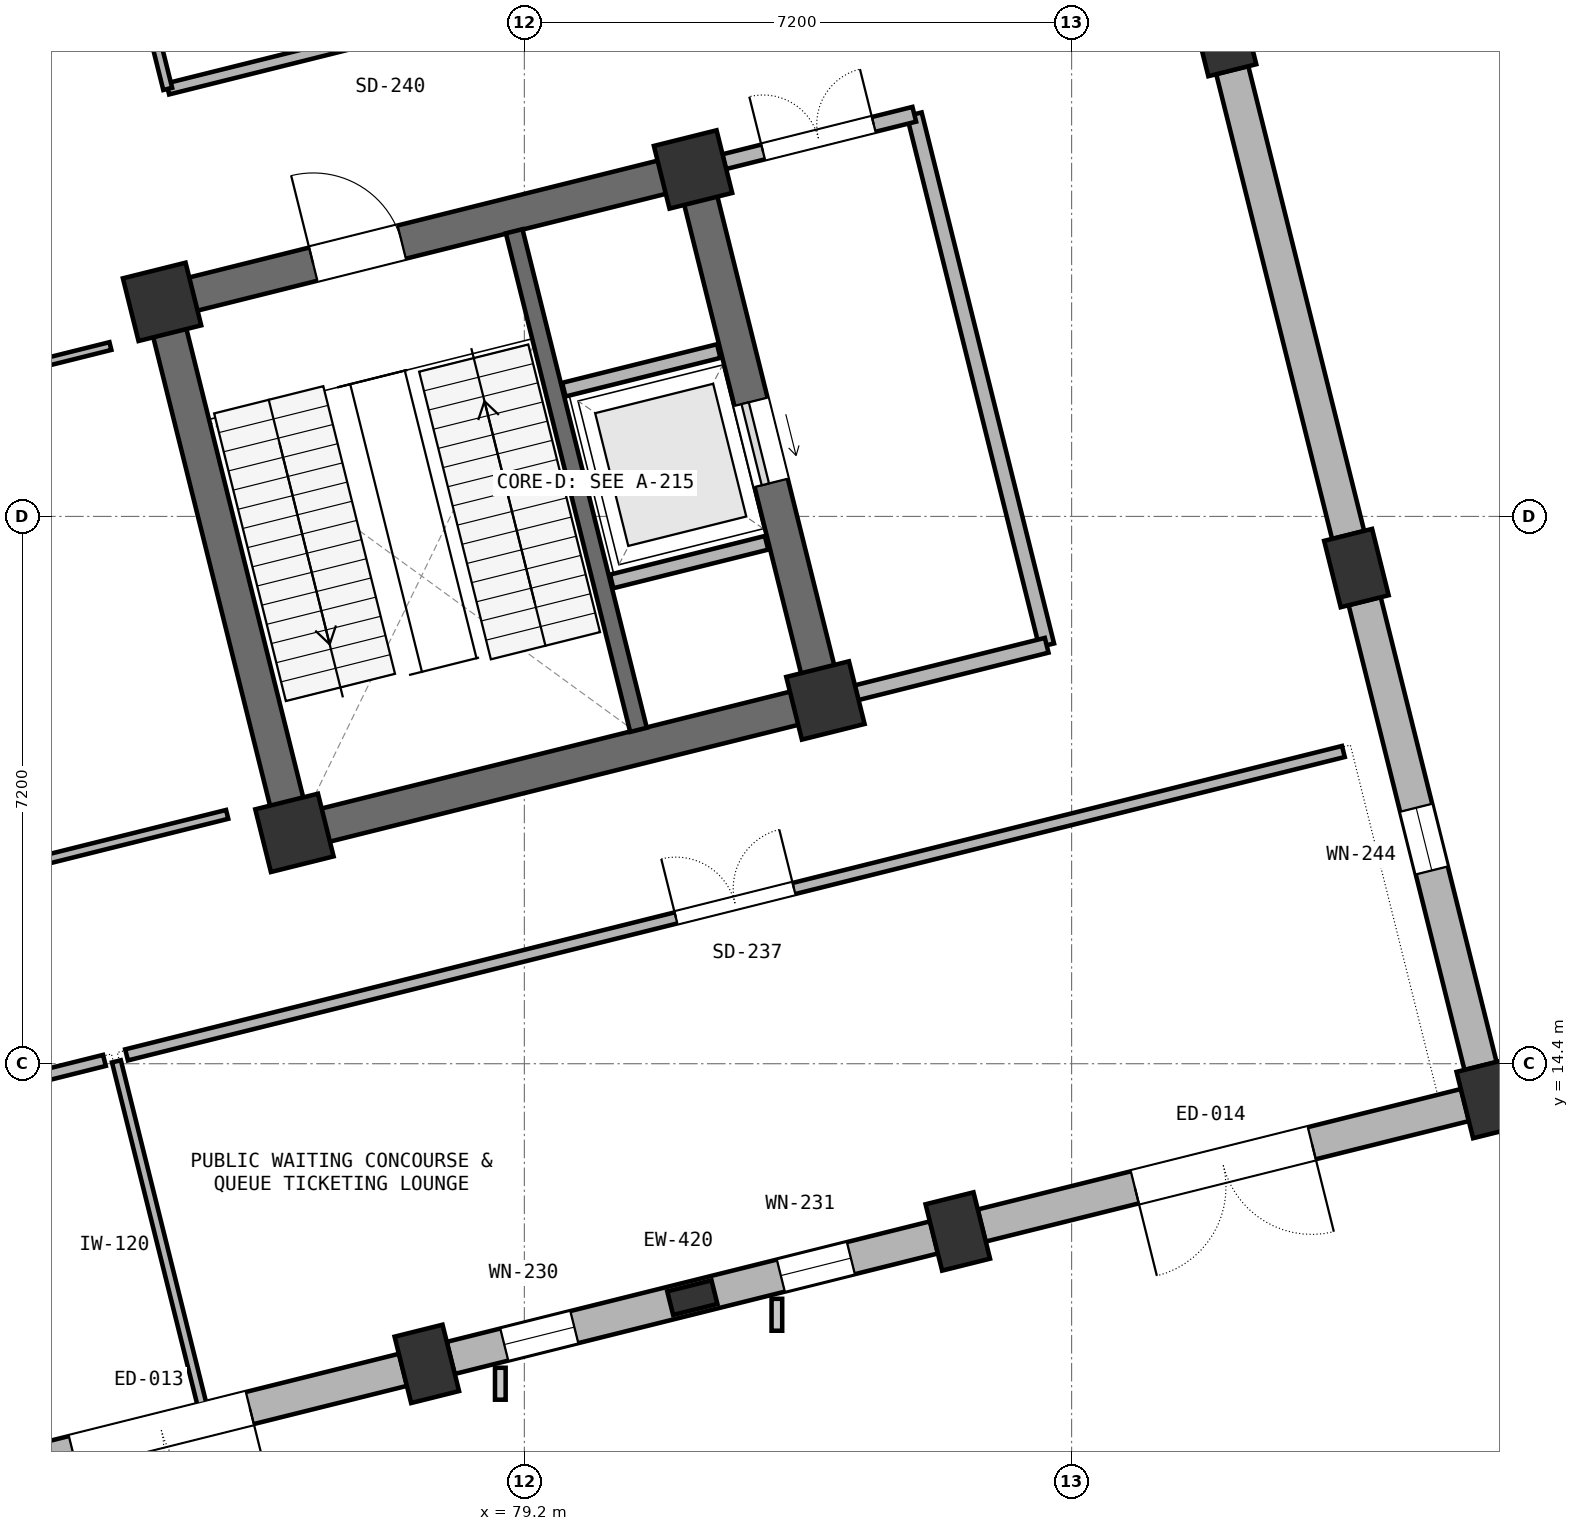
"""IFC4 building model, lengths in metres.
Left out: names, types, materials, properties, quantities, classifications, styles, units other than length and angle.
Written with IfcOpenShell. Run it as: python <this file> out.ifc"""

import sys

from ifc_helpers import new_model, si_unit, direction, frame, frame_2d, origin, origin_2d, place, context, subcontext, project, spatial, rectangle, extrude, element, fill, save


model = new_model("IFC4")
c1 = context("Model", 3, precision=1e-05, world=origin(), true_north=direction((0.0, 1.0)))
c2 = subcontext(c1, "Body", "Model", "MODEL_VIEW")
j1 = project(units=[si_unit("LENGTHUNIT", "METRE"), si_unit("PLANEANGLEUNIT", "RADIAN")], contexts=[c1])
p1 = place(None, origin())
s1 = spatial("IfcSite", under=j1, at=p1, CompositionType="ELEMENT")
p2 = place(p1, origin())
s2 = spatial("IfcBuilding", under=s1, at=p2, CompositionType="ELEMENT")
p3 = place(p2, origin())
s3 = spatial("IfcBuildingStorey", under=s2, at=p3, CompositionType="ELEMENT", Elevation=0.0)
p4 = place(p3, frame((77.917, 10.451, 0.0), z_axis=(0.0, 0.0, 1.0), x_axis=(0.970295726276, 0.2419218956, 0.0)))
e1 = element("IfcColumn", 1, at=p4, inside=s3, PredefinedType="COLUMN", context=c2, shape_type="SweptSolid", body=[
    extrude(rectangle(XDim=0.65, YDim=0.9, at=origin_2d()), origin(), (0.0, 0.0, 1.0), 5.4),
])
for number, where, z_axis, x_axis in (
    (2, (76.175, 17.437, 0.0), (0.0, 0.0, 1.0), (0.97, 0.242, 0.0)),
    (3, (74.433, 24.423, 0.0), (0.0, 0.0, 1.0), (0.97, 0.242, 0.0)),
):
    element("IfcColumn", number, at=place(p3, frame(where, z_axis=z_axis, x_axis=x_axis)), inside=s3, PredefinedType="COLUMN", context=c2, shape_type="SweptSolid", body=[
        extrude(rectangle(XDim=0.85, YDim=0.85, at=origin_2d()), origin(), (0.0, 0.0, 1.0), 5.4),
    ])
p5 = place(p3, frame((84.903, 12.193, 0.0), z_axis=(0.0, 0.0, 1.0), x_axis=(0.970295726276, 0.2419218956, 0.0)))
e4 = element("IfcColumn", 4, at=p5, inside=s3, PredefinedType="COLUMN", context=c2, shape_type="SweptSolid", body=[
    extrude(rectangle(XDim=0.65, YDim=0.9, at=origin_2d()), origin(), (0.0, 0.0, 1.0), 5.4),
])
for number, where, z_axis, x_axis in (
    (5, (83.161, 19.179, 0.0), (0.0, 0.0, 1.0), (0.97, 0.242, 0.0)),
    (6, (81.419, 26.165, 0.0), (0.0, 0.0, 1.0), (0.97, 0.242, 0.0)),
):
    element("IfcColumn", number, at=place(p3, frame(where, z_axis=z_axis, x_axis=x_axis)), inside=s3, PredefinedType="COLUMN", context=c2, shape_type="SweptSolid", body=[
        extrude(rectangle(XDim=0.85, YDim=0.85, at=origin_2d()), origin(), (0.0, 0.0, 1.0), 5.4),
    ])
for number, where, z_axis, x_axis in (
    (7, (91.889, 13.935, 0.0), (0.0, 0.0, 1.0), (0.97, 0.242, 0.0)),
    (8, (90.147, 20.921, 0.0), (0.0, 0.0, 1.0), (0.97, 0.242, 0.0)),
    (9, (88.405, 27.907, 0.0), (0.0, 0.0, 1.0), (0.97, 0.242, 0.0)),
):
    element("IfcColumn", number, at=place(p3, frame(where, z_axis=z_axis, x_axis=x_axis)), inside=s3, PredefinedType="COLUMN", context=c2, shape_type="SweptSolid", body=[
        extrude(rectangle(XDim=0.65, YDim=0.9, at=origin_2d()), origin(), (0.0, 0.0, 1.0), 5.4),
    ])
p6 = place(p3, frame((81.41, 11.322, 0.0), z_axis=(0.0, 0.0, 1.0), x_axis=(0.970295726276, 0.2419218956, 0.0)))
e10 = element("IfcColumn", 10, at=p6, inside=s3, PredefinedType="PILASTER", context=c2, shape_type="SweptSolid", body=[
    extrude(rectangle(XDim=0.6, YDim=0.32, at=origin_2d()), origin(), (0.0, 0.0, 1.0), 5.4),
])
p7 = place(p3, frame((76.515, 17.522, 0.0), z_axis=(0.0, 0.0, 1.0), x_axis=(0.970294759049, 0.241925774902, 0.0)))
e11 = element("IfcWall", 11, at=p7, inside=s3, PredefinedType="SHEAR", context=c2, shape_type="SweptSolid", body=[
    extrude(rectangle(XDim=6.5, YDim=0.45, at=frame_2d((3.25, 0.0))), origin(), (0.0, 0.0, 1.0), 5.4),
])
p8 = place(p3, frame((83.076, 19.519, 0.0), z_axis=(0.0, 0.0, 1.0), x_axis=(-0.241925774902, 0.970294759049, 0.0)))
e12 = element("IfcWall", 12, at=p8, inside=s3, PredefinedType="SHEAR", context=c2, shape_type="SweptSolid", body=[
    extrude(rectangle(XDim=6.5, YDim=0.45, at=frame_2d((3.25, 0.0))), origin(), (0.0, 0.0, 1.0), 5.4),
])
p9 = place(p8, frame((2.6, 0.0, 0.0)))
e13 = element("IfcOpeningElement", 13, at=p9, cuts=e12, PredefinedType="OPENING", context=c2, shape_type="SweptSolid", body=[
    extrude(rectangle(XDim=1.1, YDim=2.2, at=frame_2d((0.55, 1.1))), frame((0.0, 0.235, 0.0), z_axis=(0.0, -1.0, 0.0), x_axis=(1.0, 0.0, 0.0)), (0.0, 0.0, 1.0), 0.47),
])
p10 = place(p3, frame((81.08, 26.081, 0.0), z_axis=(0.0, 0.0, 1.0), x_axis=(-0.970294759049, -0.241925774902, 0.0)))
e14 = element("IfcWall", 14, at=p10, inside=s3, PredefinedType="SHEAR", context=c2, shape_type="SweptSolid", body=[
    extrude(rectangle(XDim=6.5, YDim=0.45, at=frame_2d((3.25, 0.0))), origin(), (0.0, 0.0, 1.0), 5.4),
])
p11 = place(p10, frame((3.6, 0.0, 0.0)))
e15 = element("IfcOpeningElement", 15, at=p11, cuts=e14, PredefinedType="OPENING", context=c2, shape_type="SweptSolid", body=[
    extrude(rectangle(XDim=1.2, YDim=2.2, at=frame_2d((0.6, 1.1))), frame((0.0, 0.235, 0.0), z_axis=(0.0, -1.0, 0.0), x_axis=(1.0, 0.0, 0.0)), (0.0, 0.0, 1.0), 0.47),
])
p12 = place(p3, frame((74.518, 24.084, 0.0), z_axis=(0.0, 0.0, 1.0), x_axis=(0.241925774902, -0.970294759049, 0.0)))
e16 = element("IfcWall", 16, at=p12, inside=s3, PredefinedType="SHEAR", context=c2, shape_type="SweptSolid", body=[
    extrude(rectangle(XDim=6.5, YDim=0.45, at=frame_2d((3.25, 0.0))), origin(), (0.0, 0.0, 1.0), 5.4),
])
p13 = place(p3, frame((80.701, 18.792, 0.0), z_axis=(0.0, 0.0, 1.0), x_axis=(-0.241898249226, 0.970301621673, 0.0)))
e17 = element("IfcWall", 17, at=p13, inside=s3, PredefinedType="SHEAR", context=c2, shape_type="SweptSolid", body=[
    extrude(rectangle(XDim=6.76, YDim=0.225, at=frame_2d((3.38, 0.0))), origin(), (0.0, 0.0, 1.0), 5.4),
])
for number, where, z_axis, x_axis in (
    (18, (80.349, 20.745, 0.0), (0.0, 0.0, 1.0), (0.97, 0.242, 0.0)),
    (19, (79.72, 23.268, 0.0), (0.0, 0.0, 1.0), (0.97, 0.242, 0.0)),
):
    element("IfcWall", number, at=place(p3, frame(where, z_axis=z_axis, x_axis=x_axis)), inside=s3, PredefinedType="PARTITIONING", context=c2, shape_type="SweptSolid", body=[
        extrude(rectangle(XDim=2.1, YDim=0.185, at=frame_2d((1.05, 0.0))), origin(), (0.0, 0.0, 1.0), 5.4),
    ])
p14 = place(p3, frame((71.244, 8.787, 0.0), z_axis=(0.0, 0.0, 1.0), x_axis=(0.970297881629, 0.241913250789, 0.0)))
e20 = element("IfcWall", 20, at=p14, inside=s3, PredefinedType="SOLIDWALL", context=c2, shape_type="SweptSolid", body=[
    extrude(rectangle(XDim=6.554, YDim=0.435, at=frame_2d((3.277, 0.0))), origin(), (0.0, 0.0, 1.0), 4.1),
])
p15 = place(p14, frame((2.077, 0.0, 0.0)))
e21 = element("IfcOpeningElement", 21, at=p15, cuts=e20, PredefinedType="OPENING", context=c2, shape_type="SweptSolid", body=[
    extrude(rectangle(XDim=2.4, YDim=2.8, at=frame_2d((1.2, 1.4))), frame((0.0, 0.228, 0.0), z_axis=(0.0, -1.0, 0.0), x_axis=(1.0, 0.0, 0.0)), (0.0, 0.0, 1.0), 0.455),
])
p16 = place(p3, frame((78.23, 10.529, 0.0), z_axis=(0.0, 0.0, 1.0), x_axis=(0.970291317579, 0.24193957723, 0.0)))
e22 = element("IfcWall", 22, at=p16, inside=s3, PredefinedType="SOLIDWALL", context=c2, shape_type="SweptSolid", body=[
    extrude(rectangle(XDim=6.554, YDim=0.435, at=frame_2d((3.277, 0.0))), origin(), (0.0, 0.0, 1.0), 4.1),
])
p17 = place(p16, frame((0.727, 0.0, 0.7)))
e23 = element("IfcOpeningElement", 23, at=p17, cuts=e22, PredefinedType="OPENING", context=c2, shape_type="SweptSolid", body=[
    extrude(rectangle(XDim=0.95, YDim=2.4, at=frame_2d((0.475, 1.2))), frame((0.0, 0.228, 0.0), z_axis=(0.0, -1.0, 0.0), x_axis=(1.0, 0.0, 0.0)), (0.0, 0.0, 1.0), 0.455),
])
p18 = place(p16, frame((4.477, 0.0, 0.7)))
e24 = element("IfcOpeningElement", 24, at=p18, cuts=e22, PredefinedType="OPENING", context=c2, shape_type="SweptSolid", body=[
    extrude(rectangle(XDim=0.95, YDim=2.4, at=frame_2d((0.475, 1.2))), frame((0.0, 0.228, 0.0), z_axis=(0.0, -1.0, 0.0), x_axis=(1.0, 0.0, 0.0)), (0.0, 0.0, 1.0), 0.455),
])
p19 = place(p3, frame((85.216, 12.271, 0.0), z_axis=(0.0, 0.0, 1.0), x_axis=(0.970300061562, 0.241904507055, 0.0)))
e25 = element("IfcWall", 25, at=p19, inside=s3, PredefinedType="SOLIDWALL", context=c2, shape_type="SweptSolid", body=[
    extrude(rectangle(XDim=6.554, YDim=0.435, at=frame_2d((3.277, 0.0))), origin(), (0.0, 0.0, 1.0), 4.1),
])
p20 = place(p19, frame((2.077, 0.0, 0.0)))
e26 = element("IfcOpeningElement", 26, at=p20, cuts=e25, PredefinedType="OPENING", context=c2, shape_type="SweptSolid", body=[
    extrude(rectangle(XDim=2.4, YDim=2.8, at=frame_2d((1.2, 1.4))), frame((0.0, 0.228, 0.0), z_axis=(0.0, -1.0, 0.0), x_axis=(1.0, 0.0, 0.0)), (0.0, 0.0, 1.0), 0.455),
])
p21 = place(p3, frame((91.781, 14.369, 0.0), z_axis=(0.0, 0.0, 1.0), x_axis=(-0.241934154531, 0.970292669699, 0.0)))
e27 = element("IfcWall", 27, at=p21, inside=s3, PredefinedType="SOLIDWALL", context=c2, shape_type="SweptSolid", body=[
    extrude(rectangle(XDim=6.304, YDim=0.435, at=frame_2d((3.152, 0.0))), origin(), (0.0, 0.0, 1.0), 4.1),
])
p22 = place(p21, frame((2.652, 0.0, 0.7)))
e28 = element("IfcOpeningElement", 28, at=p22, cuts=e27, PredefinedType="OPENING", context=c2, shape_type="SweptSolid", body=[
    extrude(rectangle(XDim=0.85, YDim=2.2, at=frame_2d((0.425, 1.1))), frame((0.0, 0.228, 0.0), z_axis=(0.0, -1.0, 0.0), x_axis=(1.0, 0.0, 0.0)), (0.0, 0.0, 1.0), 0.455),
])
p23 = place(p3, frame((90.039, 21.355, 0.0), z_axis=(0.0, 0.0, 1.0), x_axis=(-0.241934154531, 0.970292669699, 0.0)))
e29 = element("IfcWall", 29, at=p23, inside=s3, PredefinedType="SOLIDWALL", context=c2, shape_type="SweptSolid", body=[
    extrude(rectangle(XDim=6.304, YDim=0.435, at=frame_2d((3.152, 0.0))), origin(), (0.0, 0.0, 1.0), 4.1),
])
p24 = place(p3, frame((86.072, 19.905, 0.0), z_axis=(0.0, 0.0, 1.0), x_axis=(-0.241937193493, 0.970291911955, 0.0)))
e30 = element("IfcWall", 30, at=p24, inside=s3, PredefinedType="PARTITIONING", context=c2, shape_type="SweptSolid", body=[
    extrude(rectangle(XDim=7.2, YDim=0.2, at=frame_2d((3.6, 0.0))), origin(), (0.0, 0.0, 1.0), 4.12),
])
p25 = place(p3, frame((83.569, 19.281, 0.0), z_axis=(0.0, 0.0, 1.0), x_axis=(0.970287048366, 0.241956698135, 0.0)))
e31 = element("IfcWall", 31, at=p25, inside=s3, PredefinedType="PARTITIONING", context=c2, shape_type="SweptSolid", body=[
    extrude(rectangle(XDim=2.58, YDim=0.2, at=frame_2d((1.29, 0.0))), origin(), (0.0, 0.0, 1.0), 4.12),
])
p26 = place(p3, frame((84.33, 26.891, 0.0), z_axis=(0.0, 0.0, 1.0), x_axis=(-0.970309259708, -0.2418676095, 0.0)))
e32 = element("IfcWall", 32, at=p26, inside=s3, PredefinedType="PARTITIONING", context=c2, shape_type="SweptSolid", body=[
    extrude(rectangle(XDim=2.58, YDim=0.2, at=frame_2d((1.29, 0.0))), origin(), (0.0, 0.0, 1.0), 4.12),
])
p27 = place(p26, frame((0.55, 0.0, 0.0)))
e33 = element("IfcOpeningElement", 33, at=p27, cuts=e32, PredefinedType="OPENING", context=c2, shape_type="SweptSolid", body=[
    extrude(rectangle(XDim=1.5, YDim=2.2, at=frame_2d((0.75, 1.1))), frame((0.0, 0.11, 0.0), z_axis=(0.0, -1.0, 0.0), x_axis=(1.0, 0.0, 0.0)), (0.0, 0.0, 1.0), 0.22),
])
p28 = place(p3, frame((54.172, 9.581, 0.0), z_axis=(0.0, 0.0, 1.0), x_axis=(0.970297344298, 0.241915405976, 0.0)))
e34 = element("IfcWall", 34, at=p28, inside=s3, PredefinedType="PARTITIONING", context=c2, shape_type="SweptSolid", body=[
    extrude(rectangle(XDim=20.1, YDim=0.15, at=frame_2d((10.05, 0.0))), origin(), (0.0, 0.0, 1.0), 4.12),
])
p29 = place(p28, frame((1.65, 0.0, 0.0)))
e35 = element("IfcOpeningElement", 35, at=p29, cuts=e34, PredefinedType="OPENING", context=c2, shape_type="SweptSolid", body=[
    extrude(rectangle(XDim=1.6, YDim=2.2, at=frame_2d((0.8, 1.1))), frame((0.0, 0.085, 0.0), z_axis=(0.0, -1.0, 0.0), x_axis=(1.0, 0.0, 0.0)), (0.0, 0.0, 1.0), 0.17),
])
p30 = place(p3, frame((73.966, 14.516, 0.0), z_axis=(0.0, 0.0, 1.0), x_axis=(0.970295493964, 0.24192282735, 0.0)))
e36 = element("IfcWall", 36, at=p30, inside=s3, PredefinedType="PARTITIONING", context=c2, shape_type="SweptSolid", body=[
    extrude(rectangle(XDim=16.5, YDim=0.15, at=frame_2d((8.25, 0.0))), origin(), (0.0, 0.0, 1.0), 4.12),
])
p31 = place(p30, frame((7.45, 0.0, 0.0)))
e37 = element("IfcOpeningElement", 37, at=p31, cuts=e36, PredefinedType="OPENING", context=c2, shape_type="SweptSolid", body=[
    extrude(rectangle(XDim=1.6, YDim=2.2, at=frame_2d((0.8, 1.1))), frame((0.0, 0.085, 0.0), z_axis=(0.0, -1.0, 0.0), x_axis=(1.0, 0.0, 0.0)), (0.0, 0.0, 1.0), 0.17),
])
p32 = place(p3, frame((74.962, 9.9, 0.0), z_axis=(0.0, 0.0, 1.0), x_axis=(-0.241945139998, 0.970289930501, 0.0)))
e38 = element("IfcWall", 38, at=p32, inside=s3, PredefinedType="PARTITIONING", context=c2, shape_type="SweptSolid", body=[
    extrude(rectangle(XDim=4.67, YDim=0.12, at=frame_2d((2.335, 0.0))), origin(), (0.0, 0.0, 1.0), 4.12),
])
p33 = place(p3, frame((73.754, 23.842, 0.0), z_axis=(0.0, 0.0, 1.0), x_axis=(-0.970295954135, -0.241920981706, 0.0)))
e39 = element("IfcWall", 39, at=p33, inside=s3, PredefinedType="PARTITIONING", context=c2, shape_type="SweptSolid", body=[
    extrude(rectangle(XDim=18.6, YDim=0.105, at=frame_2d((9.3, 0.0))), origin(), (0.0, 0.0, 1.0), 4.12),
])
p34 = place(p33, frame((9.2, 0.0, 0.0)))
e40 = element("IfcOpeningElement", 40, at=p34, cuts=e39, PredefinedType="OPENING", context=c2, shape_type="SweptSolid", body=[
    extrude(rectangle(XDim=1.6, YDim=2.2, at=frame_2d((0.8, 1.1))), frame((0.0, 0.062, 0.0), z_axis=(0.0, -1.0, 0.0), x_axis=(1.0, 0.0, 0.0)), (0.0, 0.0, 1.0), 0.125),
])
p35 = place(p3, frame((57.242, 13.18, 0.0), z_axis=(0.0, 0.0, 1.0), x_axis=(0.970295185925, 0.24192406282, 0.0)))
e41 = element("IfcWall", 41, at=p35, inside=s3, PredefinedType="PARTITIONING", context=c2, shape_type="SweptSolid", body=[
    extrude(rectangle(XDim=18.6, YDim=0.12, at=frame_2d((9.3, 0.0))), origin(), (0.0, 0.0, 1.0), 4.12),
])
p36 = place(p3, frame((74.508, 27.225, 0.0), z_axis=(0.0, 0.0, 1.0), x_axis=(0.970298350757, 0.241911369139, 0.0)))
e42 = element("IfcWall", 42, at=p36, inside=s3, PredefinedType="PARTITIONING", context=c2, shape_type="SweptSolid", body=[
    extrude(rectangle(XDim=12.7, YDim=0.15, at=frame_2d((6.35, 0.0))), origin(), (0.0, 0.0, 1.0), 4.12),
])
p37 = place(p36, frame((2.35, 0.0, 0.0)))
e43 = element("IfcOpeningElement", 43, at=p37, cuts=e42, PredefinedType="OPENING", context=c2, shape_type="SweptSolid", body=[
    extrude(rectangle(XDim=1.0, YDim=2.15, at=frame_2d((0.5, 1.075))), frame((0.0, 0.085, 0.0), z_axis=(0.0, -1.0, 0.0), x_axis=(1.0, 0.0, 0.0)), (0.0, 0.0, 1.0), 0.17),
])
p38 = place(p3, frame((74.508, 27.225, 0.0), z_axis=(0.0, 0.0, 1.0), x_axis=(-0.241924747697, 0.970295015164, 0.0)))
e44 = element("IfcWall", 44, at=p38, inside=s3, PredefinedType="PARTITIONING", context=c2, shape_type="SweptSolid", body=[
    extrude(rectangle(XDim=3.95, YDim=0.12, at=frame_2d((1.975, 0.0))), origin(), (0.0, 0.0, 1.0), 4.12),
])
p39 = place(p9, origin())
e45 = element("IfcDoor", 45, at=p39, inside=s3, OperationType="SLIDING_TO_LEFT", PredefinedType="DOOR", context=c2, shape_type="SweptSolid", body=[
    extrude(rectangle(XDim=1.1, YDim=2.2, at=frame_2d((0.55, 1.1))), frame((0.0, 0.025, 0.0), z_axis=(0.0, -1.0, 0.0), x_axis=(1.0, 0.0, 0.0)), (0.0, 0.0, 1.0), 0.05),
])
fill(e13, e45)
p40 = place(p15, frame((2.4, 0.0, 0.0), z_axis=(0.0, 0.0, 1.0), x_axis=(-1.0, 0.0, 0.0)))
e46 = element("IfcDoor", 46, at=p40, inside=s3, OperationType="DOUBLE_DOOR_SINGLE_SWING", PredefinedType="DOOR", context=c2, shape_type="SweptSolid", body=[
    extrude(rectangle(XDim=2.4, YDim=2.8, at=frame_2d((1.2, 1.4))), frame((0.0, 0.025, 0.0), z_axis=(0.0, -1.0, 0.0), x_axis=(1.0, 0.0, 0.0)), (0.0, 0.0, 1.0), 0.05),
])
fill(e21, e46)
p41 = place(p17, origin())
e47 = element("IfcWindow", 47, at=p41, inside=s3, PartitioningType="SINGLE_PANEL", PredefinedType="WINDOW", context=c2, shape_type="SweptSolid", body=[
    extrude(rectangle(XDim=0.95, YDim=2.4, at=frame_2d((0.475, 1.2))), frame((0.0, 0.03, 0.0), z_axis=(0.0, -1.0, 0.0), x_axis=(1.0, 0.0, 0.0)), (0.0, 0.0, 1.0), 0.06),
])
fill(e23, e47)
p42 = place(p18, origin())
e48 = element("IfcWindow", 48, at=p42, inside=s3, PartitioningType="SINGLE_PANEL", PredefinedType="WINDOW", context=c2, shape_type="SweptSolid", body=[
    extrude(rectangle(XDim=0.95, YDim=2.4, at=frame_2d((0.475, 1.2))), frame((0.0, 0.03, 0.0), z_axis=(0.0, -1.0, 0.0), x_axis=(1.0, 0.0, 0.0)), (0.0, 0.0, 1.0), 0.06),
])
fill(e24, e48)
p43 = place(p20, frame((2.4, 0.0, 0.0), z_axis=(0.0, 0.0, 1.0), x_axis=(-1.0, 0.0, 0.0)))
e49 = element("IfcDoor", 49, at=p43, inside=s3, OperationType="DOUBLE_DOOR_SINGLE_SWING", PredefinedType="DOOR", context=c2, shape_type="SweptSolid", body=[
    extrude(rectangle(XDim=2.4, YDim=2.8, at=frame_2d((1.2, 1.4))), frame((0.0, 0.025, 0.0), z_axis=(0.0, -1.0, 0.0), x_axis=(1.0, 0.0, 0.0)), (0.0, 0.0, 1.0), 0.05),
])
fill(e26, e49)
p44 = place(p22, origin())
e50 = element("IfcWindow", 50, at=p44, inside=s3, PartitioningType="SINGLE_PANEL", PredefinedType="WINDOW", context=c2, shape_type="SweptSolid", body=[
    extrude(rectangle(XDim=0.85, YDim=2.2, at=frame_2d((0.425, 1.1))), frame((0.0, 0.03, 0.0), z_axis=(0.0, -1.0, 0.0), x_axis=(1.0, 0.0, 0.0)), (0.0, 0.0, 1.0), 0.06),
])
fill(e28, e50)
p45 = place(p11, frame((1.2, 0.0, 0.0), z_axis=(0.0, 0.0, 1.0), x_axis=(-1.0, 0.0, 0.0)))
e51 = element("IfcDoor", 51, at=p45, inside=s3, OperationType="SINGLE_SWING_LEFT", PredefinedType="DOOR", context=c2, shape_type="SweptSolid", body=[
    extrude(rectangle(XDim=1.2, YDim=2.2, at=frame_2d((0.6, 1.1))), frame((0.0, 0.025, 0.0), z_axis=(0.0, -1.0, 0.0), x_axis=(1.0, 0.0, 0.0)), (0.0, 0.0, 1.0), 0.05),
])
fill(e15, e51)
p46 = place(p27, frame((1.5, 0.0, 0.0), z_axis=(0.0, 0.0, 1.0), x_axis=(-1.0, 0.0, 0.0)))
e52 = element("IfcDoor", 52, at=p46, inside=s3, OperationType="DOUBLE_DOOR_SINGLE_SWING", PredefinedType="DOOR", context=c2, shape_type="SweptSolid", body=[
    extrude(rectangle(XDim=1.5, YDim=2.2, at=frame_2d((0.75, 1.1))), frame((0.0, 0.025, 0.0), z_axis=(0.0, -1.0, 0.0), x_axis=(1.0, 0.0, 0.0)), (0.0, 0.0, 1.0), 0.05),
])
fill(e33, e52)
p47 = place(p31, origin())
e53 = element("IfcDoor", 53, at=p47, inside=s3, OperationType="DOUBLE_DOOR_SINGLE_SWING", PredefinedType="DOOR", context=c2, shape_type="SweptSolid", body=[
    extrude(rectangle(XDim=1.6, YDim=2.2, at=frame_2d((0.8, 1.1))), frame((0.0, 0.025, 0.0), z_axis=(0.0, -1.0, 0.0), x_axis=(1.0, 0.0, 0.0)), (0.0, 0.0, 1.0), 0.05),
])
fill(e37, e53)
save(model, sys.argv[1])
